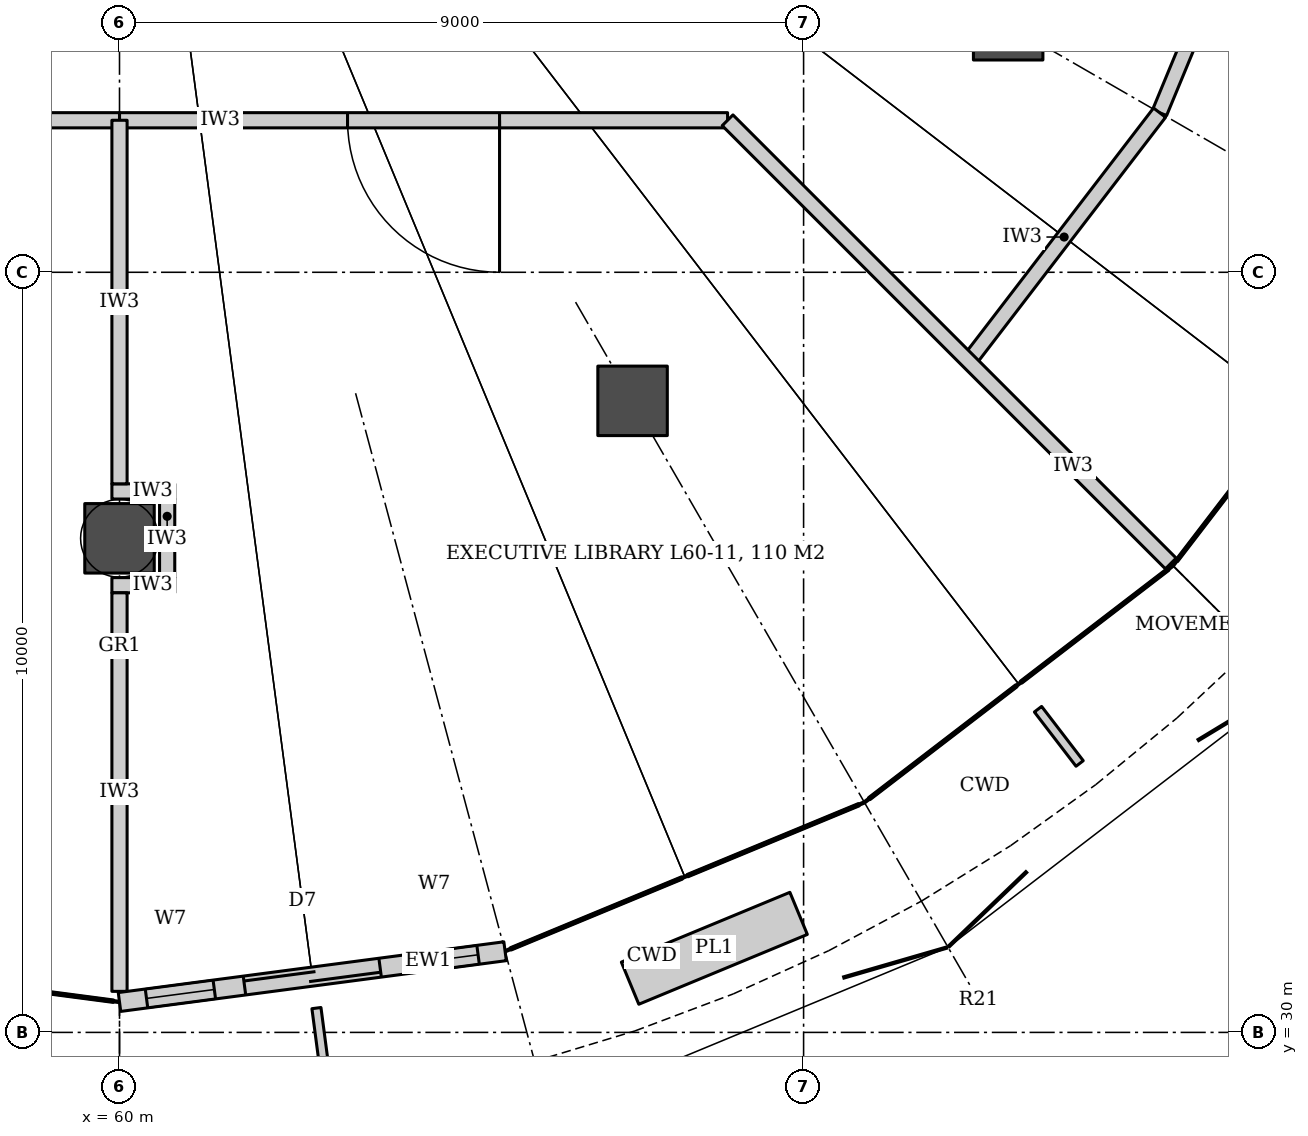
"""IFC4 building model, lengths in metres.
Left out: names, types, materials, properties, quantities, classifications, styles, units other than length and angle.
Written with IfcOpenShell. Run it as: python <this file> out.ifc"""

import sys

from ifc_helpers import new_model, si_unit, direction, frame, frame_2d, origin, origin_2d, place, context, subcontext, project, spatial, rectangle, hollow_circle, extrude, element, fill, save


model = new_model("IFC4")
c1 = context("Model", 3, precision=1e-05, world=origin(), true_north=direction((0.0, 1.0)))
c2 = subcontext(c1, "Body", "Model", "MODEL_VIEW")
j1 = project(units=[si_unit("LENGTHUNIT", "METRE"), si_unit("PLANEANGLEUNIT", "RADIAN")], contexts=[c1])
p1 = place(None, origin())
s1 = spatial("IfcSite", under=j1, at=p1, CompositionType="ELEMENT")
p2 = place(p1, origin())
s2 = spatial("IfcBuilding", under=s1, at=p2, CompositionType="ELEMENT")
p3 = place(p2, frame((0.0, 0.0, 261.2)))
s3 = spatial("IfcBuildingStorey", under=s2, at=p3, CompositionType="ELEMENT", Elevation=261.2)
for number, where, z_axis, x_axis in (
    (1, (60.0, 36.5, 0.0), (0.0, 0.0, 1.0), (1.0, 0.0, 0.0)),
    (2, (66.75, 38.309, 0.0), (0.0, 0.0, 1.0), (1.0, 0.0, 0.0)),
    (3, (71.691, 43.25, 0.0), (0.0, 0.0, 1.0), (1.0, 0.0, 0.0)),
):
    element("IfcColumn", number, at=place(p3, frame(where, z_axis=z_axis, x_axis=x_axis)), inside=s3, PredefinedType="COLUMN", context=c2, shape_type="SweptSolid", body=[
        extrude(hollow_circle(Radius=0.457, WallThickness=0.045, at=origin_2d()), origin(), (0.0, 0.0, 1.0), 4.2),
    ])
p4 = place(p3, frame((75.262, 45.911, 0.0), z_axis=(0.0, 0.0, 1.0), x_axis=(-0.382731667114, -0.923859551549, 0.0)))
e4 = element("IfcWall", 4, at=p4, inside=s3, PredefinedType="PARTITIONING", context=c2, shape_type="SweptSolid", body=[
    extrude(rectangle(XDim=4.125, YDim=0.2, at=frame_2d((2.062, 0.0))), origin(), (0.0, 0.0, 1.0), 3.02),
])
p5 = place(p3, frame((73.683, 42.1, 0.0), z_axis=(0.0, 0.0, 1.0), x_axis=(-0.608714823874, -0.793389099494, 0.0)))
e5 = element("IfcWall", 5, at=p5, inside=s3, PredefinedType="PARTITIONING", context=c2, shape_type="SweptSolid", body=[
    extrude(rectangle(XDim=4.125, YDim=0.2, at=frame_2d((2.062, 0.0))), origin(), (0.0, 0.0, 1.0), 3.02),
])
p6 = place(p3, frame((68.0, 42.0, 0.0), z_axis=(0.0, 0.0, 1.0), x_axis=(-1.0, 0.0, 0.0)))
e6 = element("IfcWall", 6, at=p6, inside=s3, PredefinedType="PARTITIONING", context=c2, shape_type="SweptSolid", body=[
    extrude(rectangle(XDim=8.0, YDim=0.2, at=frame_2d((4.0, 0.0))), origin(), (0.0, 0.0, 1.0), 3.04),
])
p7 = place(p6, frame((3.0, 0.0, 0.0)))
e7 = element("IfcOpeningElement", 7, at=p7, cuts=e6, PredefinedType="OPENING", context=c2, shape_type="SweptSolid", body=[
    extrude(rectangle(XDim=2.0, YDim=2.1, at=frame_2d((1.0, 1.05))), frame((0.0, 0.11, 0.0), z_axis=(0.0, -1.0, 0.0), x_axis=(1.0, 0.0, 0.0)), (0.0, 0.0, 1.0), 0.22),
])
p8 = place(p3, frame((60.0, 42.0, 0.0), z_axis=(0.0, 0.0, 1.0), x_axis=(-1.0, 0.0, 0.0)))
e8 = element("IfcWall", 8, at=p8, inside=s3, PredefinedType="PARTITIONING", context=c2, shape_type="SweptSolid", body=[
    extrude(rectangle(XDim=8.0, YDim=0.2, at=frame_2d((4.0, 0.0))), origin(), (0.0, 0.0, 1.0), 3.04),
])
p9 = place(p8, frame((2.8, 0.0, 0.0)))
e9 = element("IfcOpeningElement", 9, at=p9, cuts=e8, PredefinedType="OPENING", context=c2, shape_type="SweptSolid", body=[
    extrude(rectangle(XDim=2.4, YDim=2.4, at=frame_2d((1.2, 1.2))), frame((0.0, 0.11, 0.0), z_axis=(0.0, -1.0, 0.0), x_axis=(1.0, 0.0, 0.0)), (0.0, 0.0, 1.0), 0.22),
])
for number, where, z_axis, x_axis in (
    (10, (59.9, 37.117, 0.0), (0.0, 0.0, 1.0), (1.0, 0.0, 0.0)),
    (11, (59.9, 35.883, 0.0), (0.0, 0.0, 1.0), (1.0, 0.0, 0.0)),
):
    element("IfcWall", number, at=place(p3, frame(where, z_axis=z_axis, x_axis=x_axis)), inside=s3, PredefinedType="PARTITIONING", context=c2, shape_type="SweptSolid", body=[
        extrude(rectangle(XDim=0.827, YDim=0.2, at=frame_2d((0.414, 0.0))), origin(), (0.0, 0.0, 1.0), 3.02),
    ])
p10 = place(p3, frame((60.627, 37.017, 0.0), z_axis=(0.0, 0.0, 1.0), x_axis=(0.0, -1.0, 0.0)))
e12 = element("IfcWall", 12, at=p10, inside=s3, PredefinedType="PARTITIONING", context=c2, shape_type="SweptSolid", body=[
    extrude(rectangle(XDim=1.034, YDim=0.2, at=frame_2d((0.517, 0.0))), origin(), (0.0, 0.0, 1.0), 3.02),
])
p11 = place(p3, frame((60.0, 42.0, 0.0), z_axis=(0.0, 0.0, 1.0), x_axis=(0.0, -1.0, 0.0)))
e13 = element("IfcWall", 13, at=p11, inside=s3, PredefinedType="PARTITIONING", context=c2, shape_type="SweptSolid", body=[
    extrude(rectangle(XDim=4.783, YDim=0.2, at=frame_2d((2.392, 0.0))), origin(), (0.0, 0.0, 1.0), 3.04),
])
p12 = place(p3, frame((60.0, 35.783, 0.0), z_axis=(0.0, 0.0, 1.0), x_axis=(0.0, -1.0, 0.0)))
e14 = element("IfcWall", 14, at=p12, inside=s3, PredefinedType="PARTITIONING", context=c2, shape_type="SweptSolid", body=[
    extrude(rectangle(XDim=5.243, YDim=0.2, at=frame_2d((2.622, 0.0))), origin(), (0.0, 0.0, 1.0), 3.02),
])
p13 = place(p3, frame((68.0, 42.0, 0.0), z_axis=(0.0, 0.0, 1.0), x_axis=(0.707106781187, -0.707106781187, 0.0)))
e15 = element("IfcWall", 15, at=p13, inside=s3, PredefinedType="PARTITIONING", context=c2, shape_type="SweptSolid", body=[
    extrude(rectangle(XDim=8.246, YDim=0.2, at=frame_2d((4.123, 0.0))), origin(), (0.0, 0.0, 1.0), 3.02),
])
p14 = place(p3, frame((60.0, 30.4, 0.0), z_axis=(0.0, 0.0, 1.0), x_axis=(0.991441622922, 0.130550788349, 0.0)))
e16 = element("IfcWall", 16, at=p14, inside=s3, PredefinedType="SOLIDWALL", context=c2, shape_type="SweptSolid", body=[
    extrude(rectangle(XDim=5.116, YDim=0.25, at=frame_2d((2.558, 0.0))), origin(), (0.0, 0.0, 1.0), 4.04),
])
p15 = place(p14, frame((1.658, 0.0, 0.0)))
e17 = element("IfcOpeningElement", 17, at=p15, cuts=e16, PredefinedType="OPENING", context=c2, shape_type="SweptSolid", body=[
    extrude(rectangle(XDim=1.8, YDim=2.4, at=frame_2d((0.9, 1.2))), frame((0.0, 0.135, 0.0), z_axis=(0.0, -1.0, 0.0), x_axis=(1.0, 0.0, 0.0)), (0.0, 0.0, 1.0), 0.27),
])
p16 = place(p14, frame((0.358, 0.0, 0.0)))
e18 = element("IfcOpeningElement", 18, at=p16, cuts=e16, PredefinedType="OPENING", context=c2, shape_type="SweptSolid", body=[
    extrude(rectangle(XDim=0.9, YDim=2.4, at=frame_2d((0.45, 1.2))), frame((0.0, 0.135, 0.0), z_axis=(0.0, -1.0, 0.0), x_axis=(1.0, 0.0, 0.0)), (0.0, 0.0, 1.0), 0.27),
])
p17 = place(p14, frame((3.858, 0.0, 0.0)))
e19 = element("IfcOpeningElement", 19, at=p17, cuts=e16, PredefinedType="OPENING", context=c2, shape_type="SweptSolid", body=[
    extrude(rectangle(XDim=0.9, YDim=2.4, at=frame_2d((0.45, 1.2))), frame((0.0, 0.135, 0.0), z_axis=(0.0, -1.0, 0.0), x_axis=(1.0, 0.0, 0.0)), (0.0, 0.0, 1.0), 0.27),
])
p18 = place(p7, origin())
e20 = element("IfcDoor", 20, at=p18, inside=s3, OperationType="DOUBLE_DOOR_DOUBLE_SWING", PredefinedType="DOOR", context=c2, shape_type="SweptSolid", body=[
    extrude(rectangle(XDim=2.0, YDim=2.1, at=frame_2d((1.0, 1.05))), frame((0.0, 0.025, 0.0), z_axis=(0.0, -1.0, 0.0), x_axis=(1.0, 0.0, 0.0)), (0.0, 0.0, 1.0), 0.05),
])
fill(e7, e20)
p19 = place(p15, origin())
e21 = element("IfcDoor", 21, at=p19, inside=s3, OperationType="DOUBLE_DOOR_SLIDING", PredefinedType="DOOR", context=c2, shape_type="SweptSolid", body=[
    extrude(rectangle(XDim=1.8, YDim=2.4, at=frame_2d((0.9, 1.2))), frame((0.0, 0.025, 0.0), z_axis=(0.0, -1.0, 0.0), x_axis=(1.0, 0.0, 0.0)), (0.0, 0.0, 1.0), 0.05),
])
fill(e17, e21)
p20 = place(p16, origin())
e22 = element("IfcWindow", 22, at=p20, inside=s3, PartitioningType="SINGLE_PANEL", PredefinedType="WINDOW", context=c2, shape_type="SweptSolid", body=[
    extrude(rectangle(XDim=0.9, YDim=2.4, at=frame_2d((0.45, 1.2))), frame((0.0, 0.03, 0.0), z_axis=(0.0, -1.0, 0.0), x_axis=(1.0, 0.0, 0.0)), (0.0, 0.0, 1.0), 0.06),
])
fill(e18, e22)
p21 = place(p17, origin())
e23 = element("IfcWindow", 23, at=p21, inside=s3, PartitioningType="SINGLE_PANEL", PredefinedType="WINDOW", context=c2, shape_type="SweptSolid", body=[
    extrude(rectangle(XDim=0.9, YDim=2.4, at=frame_2d((0.45, 1.2))), frame((0.0, 0.03, 0.0), z_axis=(0.0, -1.0, 0.0), x_axis=(1.0, 0.0, 0.0)), (0.0, 0.0, 1.0), 0.06),
])
fill(e19, e23)
save(model, sys.argv[1])
